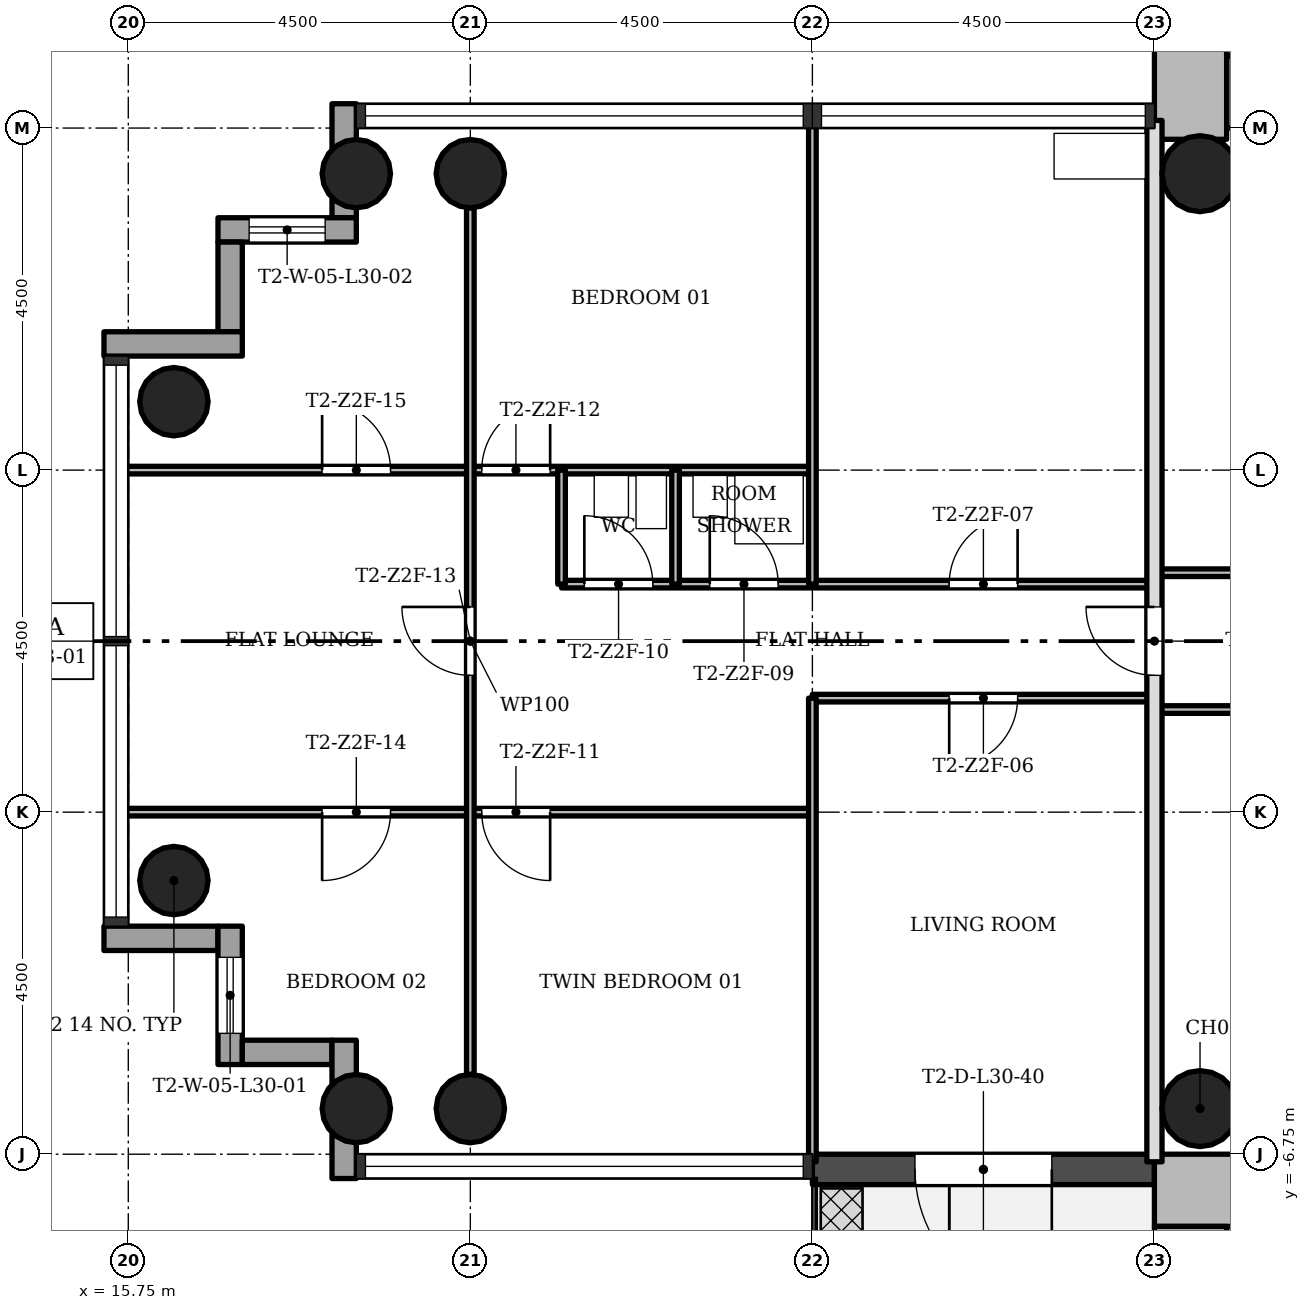
"""IFC4 building model, lengths in metres.
Left out: names, types, materials, properties, quantities, classifications, styles, units other than length and angle.
Written with IfcOpenShell. Run it as: python <this file> out.ifc"""

import sys

from ifc_helpers import new_model, si_unit, direction, frame, frame_2d, origin, origin_2d, place, context, subcontext, project, spatial, rectangle, hollow_circle, extrude, element, fill, save


model = new_model("IFC4")
c1 = context("Model", 3, precision=1e-05, world=origin(), true_north=direction((0.0, 1.0)))
c2 = subcontext(c1, "Body", "Model", "MODEL_VIEW")
j1 = project(units=[si_unit("LENGTHUNIT", "METRE"), si_unit("PLANEANGLEUNIT", "RADIAN")], contexts=[c1])
p1 = place(None, origin())
s1 = spatial("IfcSite", under=j1, at=p1, CompositionType="ELEMENT")
p2 = place(p1, origin())
s2 = spatial("IfcBuilding", under=s1, at=p2, CompositionType="ELEMENT")
p3 = place(p2, frame((0.0, 0.0, 110.6)))
s3 = spatial("IfcBuildingStorey", under=s2, at=p3, CompositionType="ELEMENT", Elevation=110.6)
p4 = place(p3, frame((30.2, 7.225, 0.0), z_axis=(0.0, 0.0, 1.0), x_axis=(1.0, 0.0, 0.0)))
e1 = element("IfcWall", 1, at=p4, inside=s3, PredefinedType="SHEAR", context=c2, shape_type="SweptSolid", body=[
    extrude(rectangle(XDim=12.55, YDim=0.95, at=frame_2d((6.275, 0.0))), origin(), (0.0, 0.0, 1.0), 3.4),
])
p5 = place(p4, frame((4.9, 0.0, 0.0)))
e2 = element("IfcOpeningElement", 2, at=p5, cuts=e1, PredefinedType="OPENING", context=c2, shape_type="SweptSolid", body=[
    extrude(rectangle(XDim=1.8, YDim=2.1, at=frame_2d((0.9, 1.05))), frame((0.0, 0.485, 0.0), z_axis=(0.0, -1.0, 0.0), x_axis=(1.0, 0.0, 0.0)), (0.0, 0.0, 1.0), 0.97),
])
p6 = place(p3, frame((29.725, 15.298, 0.0), z_axis=(0.0, 0.0, 1.0), x_axis=(0.0, -1.0, 0.0)))
e3 = element("IfcWall", 3, at=p6, inside=s3, PredefinedType="SHEAR", context=c2, shape_type="SweptSolid", body=[
    extrude(rectangle(XDim=8.696, YDim=0.95, at=frame_2d((4.348, 0.0))), origin(), (0.0, 0.0, 1.0), 3.4),
])
p7 = place(p3, frame((41.8, -7.225, 0.0), z_axis=(0.0, 0.0, 1.0), x_axis=(-1.0, 0.0, 0.0)))
e4 = element("IfcWall", 4, at=p7, inside=s3, PredefinedType="SHEAR", context=c2, shape_type="SweptSolid", body=[
    extrude(rectangle(XDim=12.55, YDim=0.95, at=frame_2d((6.275, 0.0))), origin(), (0.0, 0.0, 1.0), 3.4),
])
p8 = place(p7, frame((4.9, 0.0, 0.0)))
e5 = element("IfcOpeningElement", 5, at=p8, cuts=e4, PredefinedType="OPENING", context=c2, shape_type="SweptSolid", body=[
    extrude(rectangle(XDim=1.8, YDim=2.1, at=frame_2d((0.9, 1.05))), frame((0.0, 0.485, 0.0), z_axis=(0.0, -1.0, 0.0), x_axis=(1.0, 0.0, 0.0)), (0.0, 0.0, 1.0), 0.97),
])
p9 = place(p3, frame((29.725, -7.7, 0.0), z_axis=(0.0, 0.0, 1.0), x_axis=(0.0, -1.0, 0.0)))
e6 = element("IfcWall", 6, at=p9, inside=s3, PredefinedType="SHEAR", context=c2, shape_type="SweptSolid", body=[
    extrude(rectangle(XDim=8.05, YDim=0.95, at=frame_2d((4.025, 0.0))), origin(), (0.0, 0.0, 1.0), 3.4),
])
for number, where, z_axis, x_axis in (
    (7, (20.25, 6.15, 0.0), (0.0, 0.0, 1.0), (1.0, 0.0, 0.0)),
    (8, (20.25, -6.15, 0.0), (0.0, 0.0, 1.0), (1.0, 0.0, 0.0)),
    (9, (18.75, 6.15, 0.0), (0.0, 0.0, 1.0), (1.0, 0.0, 0.0)),
    (10, (18.75, -6.15, 0.0), (0.0, 0.0, 1.0), (1.0, 0.0, 0.0)),
    (11, (16.35, 3.15, 0.0), (0.0, 0.0, 1.0), (1.0, 0.0, 0.0)),
    (12, (16.35, -3.15, 0.0), (0.0, 0.0, 1.0), (1.0, 0.0, 0.0)),
):
    element("IfcColumn", number, at=place(p3, frame(where, z_axis=z_axis, x_axis=x_axis)), inside=s3, PredefinedType="COLUMN", context=c2, shape_type="SweptSolid", body=[
        extrude(hollow_circle(Radius=0.45, WallThickness=0.032, at=origin_2d()), origin(), (0.0, 0.0, 1.0), 3.4),
    ])
for number, where, z_axis, x_axis in (
    (13, (29.85, 6.15, 0.0), (0.0, 0.0, 1.0), (1.0, 0.0, 0.0)),
    (14, (29.85, -6.15, 0.0), (0.0, 0.0, 1.0), (1.0, 0.0, 0.0)),
):
    element("IfcColumn", number, at=place(p3, frame(where, z_axis=z_axis, x_axis=x_axis)), inside=s3, PredefinedType="COLUMN", context=c2, shape_type="SweptSolid", body=[
        extrude(hollow_circle(Radius=0.5, WallThickness=0.036, at=origin_2d()), origin(), (0.0, 0.0, 1.0), 3.4),
    ])
p10 = place(p3, frame((18.59, 7.07, -0.3), z_axis=(0.0, 0.0, 1.0), x_axis=(0.0, -1.0, 0.0)))
e15 = element("IfcWall", 15, at=p10, inside=s3, PredefinedType="STANDARD", context=c2, shape_type="SweptSolid", body=[
    extrude(rectangle(XDim=1.5, YDim=0.32, at=frame_2d((0.75, 0.0))), origin(), (0.0, 0.0, 1.0), 3.4),
])
p11 = place(p3, frame((18.75, 5.41, -0.3), z_axis=(0.0, 0.0, 1.0), x_axis=(-1.0, 0.0, 0.0)))
e16 = element("IfcWall", 16, at=p11, inside=s3, PredefinedType="STANDARD", context=c2, shape_type="SweptSolid", body=[
    extrude(rectangle(XDim=1.82, YDim=0.32, at=frame_2d((0.91, 0.0))), origin(), (0.0, 0.0, 1.0), 3.4),
])
p12 = place(p11, frame((0.41, 0.0, 1.2)))
e17 = element("IfcOpeningElement", 17, at=p12, cuts=e16, PredefinedType="OPENING", context=c2, shape_type="SweptSolid", body=[
    extrude(rectangle(XDim=1.0, YDim=1.5, at=frame_2d((0.5, 0.75))), frame((0.0, 0.17, 0.0), z_axis=(0.0, -1.0, 0.0), x_axis=(1.0, 0.0, 0.0)), (0.0, 0.0, 1.0), 0.34),
])
p13 = place(p3, frame((17.09, 5.25, -0.3), z_axis=(0.0, 0.0, 1.0), x_axis=(0.0, -1.0, 0.0)))
e18 = element("IfcWall", 18, at=p13, inside=s3, PredefinedType="STANDARD", context=c2, shape_type="SweptSolid", body=[
    extrude(rectangle(XDim=1.18, YDim=0.32, at=frame_2d((0.59, 0.0))), origin(), (0.0, 0.0, 1.0), 3.4),
])
p14 = place(p3, frame((17.25, 3.91, -0.3), z_axis=(0.0, 0.0, 1.0), x_axis=(-1.0, 0.0, 0.0)))
e19 = element("IfcWall", 19, at=p14, inside=s3, PredefinedType="STANDARD", context=c2, shape_type="SweptSolid", body=[
    extrude(rectangle(XDim=1.82, YDim=0.32, at=frame_2d((0.91, 0.0))), origin(), (0.0, 0.0, 1.0), 3.4),
])
p15 = place(p3, frame((15.43, -3.91, -0.3), z_axis=(0.0, 0.0, 1.0), x_axis=(1.0, 0.0, 0.0)))
e20 = element("IfcWall", 20, at=p15, inside=s3, PredefinedType="STANDARD", context=c2, shape_type="SweptSolid", body=[
    extrude(rectangle(XDim=1.5, YDim=0.32, at=frame_2d((0.75, 0.0))), origin(), (0.0, 0.0, 1.0), 3.4),
])
p16 = place(p3, frame((17.09, -3.75, -0.3), z_axis=(0.0, 0.0, 1.0), x_axis=(0.0, -1.0, 0.0)))
e21 = element("IfcWall", 21, at=p16, inside=s3, PredefinedType="STANDARD", context=c2, shape_type="SweptSolid", body=[
    extrude(rectangle(XDim=1.82, YDim=0.32, at=frame_2d((0.91, 0.0))), origin(), (0.0, 0.0, 1.0), 3.4),
])
p17 = place(p16, frame((0.41, 0.0, 1.2)))
e22 = element("IfcOpeningElement", 22, at=p17, cuts=e21, PredefinedType="OPENING", context=c2, shape_type="SweptSolid", body=[
    extrude(rectangle(XDim=1.0, YDim=1.5, at=frame_2d((0.5, 0.75))), frame((0.0, 0.17, 0.0), z_axis=(0.0, -1.0, 0.0), x_axis=(1.0, 0.0, 0.0)), (0.0, 0.0, 1.0), 0.34),
])
p18 = place(p3, frame((17.25, -5.41, -0.3), z_axis=(0.0, 0.0, 1.0), x_axis=(1.0, 0.0, 0.0)))
e23 = element("IfcWall", 23, at=p18, inside=s3, PredefinedType="STANDARD", context=c2, shape_type="SweptSolid", body=[
    extrude(rectangle(XDim=1.18, YDim=0.32, at=frame_2d((0.59, 0.0))), origin(), (0.0, 0.0, 1.0), 3.4),
])
p19 = place(p3, frame((18.59, -5.25, -0.3), z_axis=(0.0, 0.0, 1.0), x_axis=(0.0, -1.0, 0.0)))
e24 = element("IfcWall", 24, at=p19, inside=s3, PredefinedType="STANDARD", context=c2, shape_type="SweptSolid", body=[
    extrude(rectangle(XDim=1.82, YDim=0.32, at=frame_2d((0.91, 0.0))), origin(), (0.0, 0.0, 1.0), 3.4),
])
p20 = place(p3, frame((24.75, -6.95, -0.02), z_axis=(0.0, 0.0, 1.0), x_axis=(1.0, 0.0, 0.0)))
e25 = element("IfcWall", 25, at=p20, inside=s3, PredefinedType="STANDARD", context=c2, shape_type="SweptSolid", body=[
    extrude(rectangle(XDim=4.5, YDim=0.4, at=frame_2d((2.25, 0.0))), origin(), (0.0, 0.0, 1.0), 3.12),
])
p21 = place(p20, frame((1.35, 0.0, 0.02)))
e26 = element("IfcOpeningElement", 26, at=p21, cuts=e25, PredefinedType="OPENING", context=c2, shape_type="SweptSolid", body=[
    extrude(rectangle(XDim=1.8, YDim=2.1, at=frame_2d((0.9, 1.05))), frame((0.0, 0.21, 0.0), z_axis=(0.0, -1.0, 0.0), x_axis=(1.0, 0.0, 0.0)), (0.0, 0.0, 1.0), 0.42),
])
p22 = place(p3, frame((24.75, -2.25, 0.0), z_axis=(0.0, 0.0, 1.0), x_axis=(-1.0, 0.0, 0.0)))
e27 = element("IfcWall", 27, at=p22, inside=s3, PredefinedType="PARTITIONING", context=c2, shape_type="SweptSolid", body=[
    extrude(rectangle(XDim=9.1, YDim=0.1, at=frame_2d((4.55, 0.0))), origin(), (0.0, 0.0, 1.0), 3.0),
])
p23 = place(p22, frame((3.45, 0.0, 0.0)))
e28 = element("IfcOpeningElement", 28, at=p23, cuts=e27, PredefinedType="OPENING", context=c2, shape_type="SweptSolid", body=[
    extrude(rectangle(XDim=0.9, YDim=2.1, at=frame_2d((0.45, 1.05))), frame((0.0, 0.06, 0.0), z_axis=(0.0, -1.0, 0.0), x_axis=(1.0, 0.0, 0.0)), (0.0, 0.0, 1.0), 0.12),
])
p24 = place(p22, frame((5.55, 0.0, 0.0)))
e29 = element("IfcOpeningElement", 29, at=p24, cuts=e27, PredefinedType="OPENING", context=c2, shape_type="SweptSolid", body=[
    extrude(rectangle(XDim=0.9, YDim=2.1, at=frame_2d((0.45, 1.05))), frame((0.0, 0.06, 0.0), z_axis=(0.0, -1.0, 0.0), x_axis=(1.0, 0.0, 0.0)), (0.0, 0.0, 1.0), 0.12),
])
p25 = place(p3, frame((34.5, -0.9, 0.0), z_axis=(0.0, 0.0, 1.0), x_axis=(-1.0, 0.0, 0.0)))
e30 = element("IfcWall", 30, at=p25, inside=s3, PredefinedType="PARTITIONING", context=c2, shape_type="SweptSolid", body=[
    extrude(rectangle(XDim=5.25, YDim=0.1, at=frame_2d((2.625, 0.0))), origin(), (0.0, 0.0, 1.0), 3.0),
])
p26 = place(p3, frame((29.25, -0.75, 0.0), z_axis=(0.0, 0.0, 1.0), x_axis=(-1.0, 0.0, 0.0)))
e31 = element("IfcWall", 31, at=p26, inside=s3, PredefinedType="PARTITIONING", context=c2, shape_type="SweptSolid", body=[
    extrude(rectangle(XDim=4.5, YDim=0.1, at=frame_2d((2.25, 0.0))), origin(), (0.0, 0.0, 1.0), 3.0),
])
p27 = place(p26, frame((1.8, 0.0, 0.0)))
e32 = element("IfcOpeningElement", 32, at=p27, cuts=e31, PredefinedType="OPENING", context=c2, shape_type="SweptSolid", body=[
    extrude(rectangle(XDim=0.9, YDim=2.1, at=frame_2d((0.45, 1.05))), frame((0.0, 0.06, 0.0), z_axis=(0.0, -1.0, 0.0), x_axis=(1.0, 0.0, 0.0)), (0.0, 0.0, 1.0), 0.12),
])
p28 = place(p3, frame((29.25, 0.75, 0.0), z_axis=(0.0, 0.0, 1.0), x_axis=(-1.0, 0.0, 0.0)))
e33 = element("IfcWall", 33, at=p28, inside=s3, PredefinedType="PARTITIONING", context=c2, shape_type="SweptSolid", body=[
    extrude(rectangle(XDim=7.8, YDim=0.1, at=frame_2d((3.9, 0.0))), origin(), (0.0, 0.0, 1.0), 3.0),
])
p29 = place(p28, frame((1.8, 0.0, 0.0)))
e34 = element("IfcOpeningElement", 34, at=p29, cuts=e33, PredefinedType="OPENING", context=c2, shape_type="SweptSolid", body=[
    extrude(rectangle(XDim=0.9, YDim=2.1, at=frame_2d((0.45, 1.05))), frame((0.0, 0.06, 0.0), z_axis=(0.0, -1.0, 0.0), x_axis=(1.0, 0.0, 0.0)), (0.0, 0.0, 1.0), 0.12),
])
p30 = place(p28, frame((4.95, 0.0, 0.0)))
e35 = element("IfcOpeningElement", 35, at=p30, cuts=e33, PredefinedType="OPENING", context=c2, shape_type="SweptSolid", body=[
    extrude(rectangle(XDim=0.9, YDim=2.1, at=frame_2d((0.45, 1.05))), frame((0.0, 0.06, 0.0), z_axis=(0.0, -1.0, 0.0), x_axis=(1.0, 0.0, 0.0)), (0.0, 0.0, 1.0), 0.12),
])
p31 = place(p28, frame((6.6, 0.0, 0.0)))
e36 = element("IfcOpeningElement", 36, at=p31, cuts=e33, PredefinedType="OPENING", context=c2, shape_type="SweptSolid", body=[
    extrude(rectangle(XDim=0.9, YDim=2.1, at=frame_2d((0.45, 1.05))), frame((0.0, 0.06, 0.0), z_axis=(0.0, -1.0, 0.0), x_axis=(1.0, 0.0, 0.0)), (0.0, 0.0, 1.0), 0.12),
])
p32 = place(p3, frame((34.5, 0.9, 0.0), z_axis=(0.0, 0.0, 1.0), x_axis=(-1.0, 0.0, 0.0)))
e37 = element("IfcWall", 37, at=p32, inside=s3, PredefinedType="PARTITIONING", context=c2, shape_type="SweptSolid", body=[
    extrude(rectangle(XDim=5.25, YDim=0.1, at=frame_2d((2.625, 0.0))), origin(), (0.0, 0.0, 1.0), 3.0),
])
p33 = place(p32, frame((0.75, 0.0, 0.0)))
e38 = element("IfcOpeningElement", 38, at=p33, cuts=e37, PredefinedType="OPENING", context=c2, shape_type="SweptSolid", body=[
    extrude(rectangle(XDim=0.9, YDim=2.1, at=frame_2d((0.45, 1.05))), frame((0.0, 0.06, 0.0), z_axis=(0.0, -1.0, 0.0), x_axis=(1.0, 0.0, 0.0)), (0.0, 0.0, 1.0), 0.12),
])
p34 = place(p3, frame((24.75, 2.25, 0.0), z_axis=(0.0, 0.0, 1.0), x_axis=(-1.0, 0.0, 0.0)))
e39 = element("IfcWall", 39, at=p34, inside=s3, PredefinedType="PARTITIONING", context=c2, shape_type="SweptSolid", body=[
    extrude(rectangle(XDim=9.1, YDim=0.1, at=frame_2d((4.55, 0.0))), origin(), (0.0, 0.0, 1.0), 3.0),
])
p35 = place(p34, frame((3.45, 0.0, 0.0)))
e40 = element("IfcOpeningElement", 40, at=p35, cuts=e39, PredefinedType="OPENING", context=c2, shape_type="SweptSolid", body=[
    extrude(rectangle(XDim=0.9, YDim=2.1, at=frame_2d((0.45, 1.05))), frame((0.0, 0.06, 0.0), z_axis=(0.0, -1.0, 0.0), x_axis=(1.0, 0.0, 0.0)), (0.0, 0.0, 1.0), 0.12),
])
p36 = place(p34, frame((5.55, 0.0, 0.0)))
e41 = element("IfcOpeningElement", 41, at=p36, cuts=e39, PredefinedType="OPENING", context=c2, shape_type="SweptSolid", body=[
    extrude(rectangle(XDim=0.9, YDim=2.1, at=frame_2d((0.45, 1.05))), frame((0.0, 0.06, 0.0), z_axis=(0.0, -1.0, 0.0), x_axis=(1.0, 0.0, 0.0)), (0.0, 0.0, 1.0), 0.12),
])
p37 = place(p3, frame((29.25, -6.85, 0.0), z_axis=(0.0, 0.0, 1.0), x_axis=(0.0, 1.0, 0.0)))
e42 = element("IfcWall", 42, at=p37, inside=s3, PredefinedType="SOLIDWALL", context=c2, shape_type="SweptSolid", body=[
    extrude(rectangle(XDim=13.7, YDim=0.2, at=frame_2d((6.85, 0.0))), origin(), (0.0, 0.0, 1.0), 3.0),
])
p38 = place(p37, frame((6.4, 0.0, 0.0)))
e43 = element("IfcOpeningElement", 43, at=p38, cuts=e42, PredefinedType="OPENING", context=c2, shape_type="SweptSolid", body=[
    extrude(rectangle(XDim=0.9, YDim=2.1, at=frame_2d((0.45, 1.05))), frame((0.0, 0.11, 0.0), z_axis=(0.0, -1.0, 0.0), x_axis=(1.0, 0.0, 0.0)), (0.0, 0.0, 1.0), 0.22),
])
for number, where, z_axis, x_axis in (
    (44, (24.75, -6.85, 0.0), (0.0, 0.0, 1.0), (0.0, 1.0, 0.0)),
    (45, (24.75, 0.75, 0.0), (0.0, 0.0, 1.0), (0.0, 1.0, 0.0)),
):
    element("IfcWall", number, at=place(p3, frame(where, z_axis=z_axis, x_axis=x_axis)), inside=s3, PredefinedType="PARTITIONING", context=c2, shape_type="SweptSolid", body=[
        extrude(rectangle(XDim=6.1, YDim=0.1, at=frame_2d((3.05, 0.0))), origin(), (0.0, 0.0, 1.0), 3.0),
    ])
for number, where, z_axis, x_axis in (
    (46, (22.95, 0.75, 0.0), (0.0, 0.0, 1.0), (0.0, 1.0, 0.0)),
    (47, (21.45, 0.75, 0.0), (0.0, 0.0, 1.0), (0.0, 1.0, 0.0)),
):
    element("IfcWall", number, at=place(p3, frame(where, z_axis=z_axis, x_axis=x_axis)), inside=s3, PredefinedType="PARTITIONING", context=c2, shape_type="SweptSolid", body=[
        extrude(rectangle(XDim=1.5, YDim=0.1, at=frame_2d((0.75, 0.0))), origin(), (0.0, 0.0, 1.0), 3.0),
    ])
p39 = place(p3, frame((20.25, -5.7, 0.0), z_axis=(0.0, 0.0, 1.0), x_axis=(0.0, 1.0, 0.0)))
e48 = element("IfcWall", 48, at=p39, inside=s3, PredefinedType="PARTITIONING", context=c2, shape_type="SweptSolid", body=[
    extrude(rectangle(XDim=11.4, YDim=0.1, at=frame_2d((5.7, 0.0))), origin(), (0.0, 0.0, 1.0), 3.0),
])
p40 = place(p39, frame((5.25, 0.0, 0.0)))
e49 = element("IfcOpeningElement", 49, at=p40, cuts=e48, PredefinedType="OPENING", context=c2, shape_type="SweptSolid", body=[
    extrude(rectangle(XDim=0.9, YDim=2.1, at=frame_2d((0.45, 1.05))), frame((0.0, 0.06, 0.0), z_axis=(0.0, -1.0, 0.0), x_axis=(1.0, 0.0, 0.0)), (0.0, 0.0, 1.0), 0.12),
])
p41 = place(p3, frame((34.1, 7.825, 0.0), z_axis=(0.0, 0.0, 1.0), x_axis=(-1.0, 0.0, 0.0)))
e50 = element("IfcWall", 50, at=p41, inside=s3, PredefinedType="SHEAR", context=c2, shape_type="SweptSolid", body=[
    extrude(rectangle(XDim=3.9, YDim=0.25, at=frame_2d((1.95, 0.0))), origin(), (0.0, 0.0, 1.0), 3.4),
])
p42 = place(p21, origin())
e51 = element("IfcDoor", 51, at=p42, inside=s3, OperationType="SINGLE_SWING_RIGHT", PredefinedType="DOOR", context=c2, shape_type="SweptSolid", body=[
    extrude(rectangle(XDim=1.8, YDim=2.1, at=frame_2d((0.9, 1.05))), frame((0.0, 0.025, 0.0), z_axis=(0.0, -1.0, 0.0), x_axis=(1.0, 0.0, 0.0)), (0.0, 0.0, 1.0), 0.05),
])
fill(e26, e51)
p43 = place(p27, origin())
e52 = element("IfcDoor", 52, at=p43, inside=s3, OperationType="SINGLE_SWING_LEFT", PredefinedType="DOOR", context=c2, shape_type="SweptSolid", body=[
    extrude(rectangle(XDim=0.9, YDim=2.1, at=frame_2d((0.45, 1.05))), frame((0.0, 0.025, 0.0), z_axis=(0.0, -1.0, 0.0), x_axis=(1.0, 0.0, 0.0)), (0.0, 0.0, 1.0), 0.05),
])
fill(e32, e52)
p44 = place(p29, origin())
e53 = element("IfcDoor", 53, at=p44, inside=s3, OperationType="SINGLE_SWING_LEFT", PredefinedType="DOOR", context=c2, shape_type="SweptSolid", body=[
    extrude(rectangle(XDim=0.9, YDim=2.1, at=frame_2d((0.45, 1.05))), frame((0.0, 0.025, 0.0), z_axis=(0.0, -1.0, 0.0), x_axis=(1.0, 0.0, 0.0)), (0.0, 0.0, 1.0), 0.05),
])
fill(e34, e53)
p45 = place(p38, origin())
e54 = element("IfcDoor", 54, at=p45, inside=s3, OperationType="SINGLE_SWING_LEFT", PredefinedType="DOOR", context=c2, shape_type="SweptSolid", body=[
    extrude(rectangle(XDim=0.9, YDim=2.1, at=frame_2d((0.45, 1.05))), frame((0.0, 0.025, 0.0), z_axis=(0.0, -1.0, 0.0), x_axis=(1.0, 0.0, 0.0)), (0.0, 0.0, 1.0), 0.05),
])
fill(e43, e54)
p46 = place(p30, origin())
e55 = element("IfcDoor", 55, at=p46, inside=s3, OperationType="SINGLE_SWING_RIGHT", PredefinedType="DOOR", context=c2, shape_type="SweptSolid", body=[
    extrude(rectangle(XDim=0.9, YDim=2.1, at=frame_2d((0.45, 1.05))), frame((0.0, 0.025, 0.0), z_axis=(0.0, -1.0, 0.0), x_axis=(1.0, 0.0, 0.0)), (0.0, 0.0, 1.0), 0.05),
])
fill(e35, e55)
p47 = place(p31, origin())
e56 = element("IfcDoor", 56, at=p47, inside=s3, OperationType="SINGLE_SWING_RIGHT", PredefinedType="DOOR", context=c2, shape_type="SweptSolid", body=[
    extrude(rectangle(XDim=0.9, YDim=2.1, at=frame_2d((0.45, 1.05))), frame((0.0, 0.025, 0.0), z_axis=(0.0, -1.0, 0.0), x_axis=(1.0, 0.0, 0.0)), (0.0, 0.0, 1.0), 0.05),
])
fill(e36, e56)
p48 = place(p23, origin())
e57 = element("IfcDoor", 57, at=p48, inside=s3, OperationType="SINGLE_SWING_RIGHT", PredefinedType="DOOR", context=c2, shape_type="SweptSolid", body=[
    extrude(rectangle(XDim=0.9, YDim=2.1, at=frame_2d((0.45, 1.05))), frame((0.0, 0.025, 0.0), z_axis=(0.0, -1.0, 0.0), x_axis=(1.0, 0.0, 0.0)), (0.0, 0.0, 1.0), 0.05),
])
fill(e28, e57)
p49 = place(p35, origin())
e58 = element("IfcDoor", 58, at=p49, inside=s3, OperationType="SINGLE_SWING_LEFT", PredefinedType="DOOR", context=c2, shape_type="SweptSolid", body=[
    extrude(rectangle(XDim=0.9, YDim=2.1, at=frame_2d((0.45, 1.05))), frame((0.0, 0.025, 0.0), z_axis=(0.0, -1.0, 0.0), x_axis=(1.0, 0.0, 0.0)), (0.0, 0.0, 1.0), 0.05),
])
fill(e40, e58)
p50 = place(p40, origin())
e59 = element("IfcDoor", 59, at=p50, inside=s3, OperationType="SINGLE_SWING_LEFT", PredefinedType="DOOR", context=c2, shape_type="SweptSolid", body=[
    extrude(rectangle(XDim=0.9, YDim=2.1, at=frame_2d((0.45, 1.05))), frame((0.0, 0.025, 0.0), z_axis=(0.0, -1.0, 0.0), x_axis=(1.0, 0.0, 0.0)), (0.0, 0.0, 1.0), 0.05),
])
fill(e49, e59)
p51 = place(p24, origin())
e60 = element("IfcDoor", 60, at=p51, inside=s3, OperationType="SINGLE_SWING_LEFT", PredefinedType="DOOR", context=c2, shape_type="SweptSolid", body=[
    extrude(rectangle(XDim=0.9, YDim=2.1, at=frame_2d((0.45, 1.05))), frame((0.0, 0.025, 0.0), z_axis=(0.0, -1.0, 0.0), x_axis=(1.0, 0.0, 0.0)), (0.0, 0.0, 1.0), 0.05),
])
fill(e29, e60)
p52 = place(p36, origin())
e61 = element("IfcDoor", 61, at=p52, inside=s3, OperationType="SINGLE_SWING_RIGHT", PredefinedType="DOOR", context=c2, shape_type="SweptSolid", body=[
    extrude(rectangle(XDim=0.9, YDim=2.1, at=frame_2d((0.45, 1.05))), frame((0.0, 0.025, 0.0), z_axis=(0.0, -1.0, 0.0), x_axis=(1.0, 0.0, 0.0)), (0.0, 0.0, 1.0), 0.05),
])
fill(e41, e61)
p53 = place(p17, origin())
e62 = element("IfcWindow", 62, at=p53, inside=s3, PartitioningType="SINGLE_PANEL", PredefinedType="WINDOW", context=c2, shape_type="SweptSolid", body=[
    extrude(rectangle(XDim=1.0, YDim=1.5, at=frame_2d((0.5, 0.75))), frame((0.0, 0.03, 0.0), z_axis=(0.0, -1.0, 0.0), x_axis=(1.0, 0.0, 0.0)), (0.0, 0.0, 1.0), 0.06),
])
fill(e22, e62)
p54 = place(p12, origin())
e63 = element("IfcWindow", 63, at=p54, inside=s3, PartitioningType="SINGLE_PANEL", PredefinedType="WINDOW", context=c2, shape_type="SweptSolid", body=[
    extrude(rectangle(XDim=1.0, YDim=1.5, at=frame_2d((0.5, 0.75))), frame((0.0, 0.03, 0.0), z_axis=(0.0, -1.0, 0.0), x_axis=(1.0, 0.0, 0.0)), (0.0, 0.0, 1.0), 0.06),
])
fill(e17, e63)
save(model, sys.argv[1])
